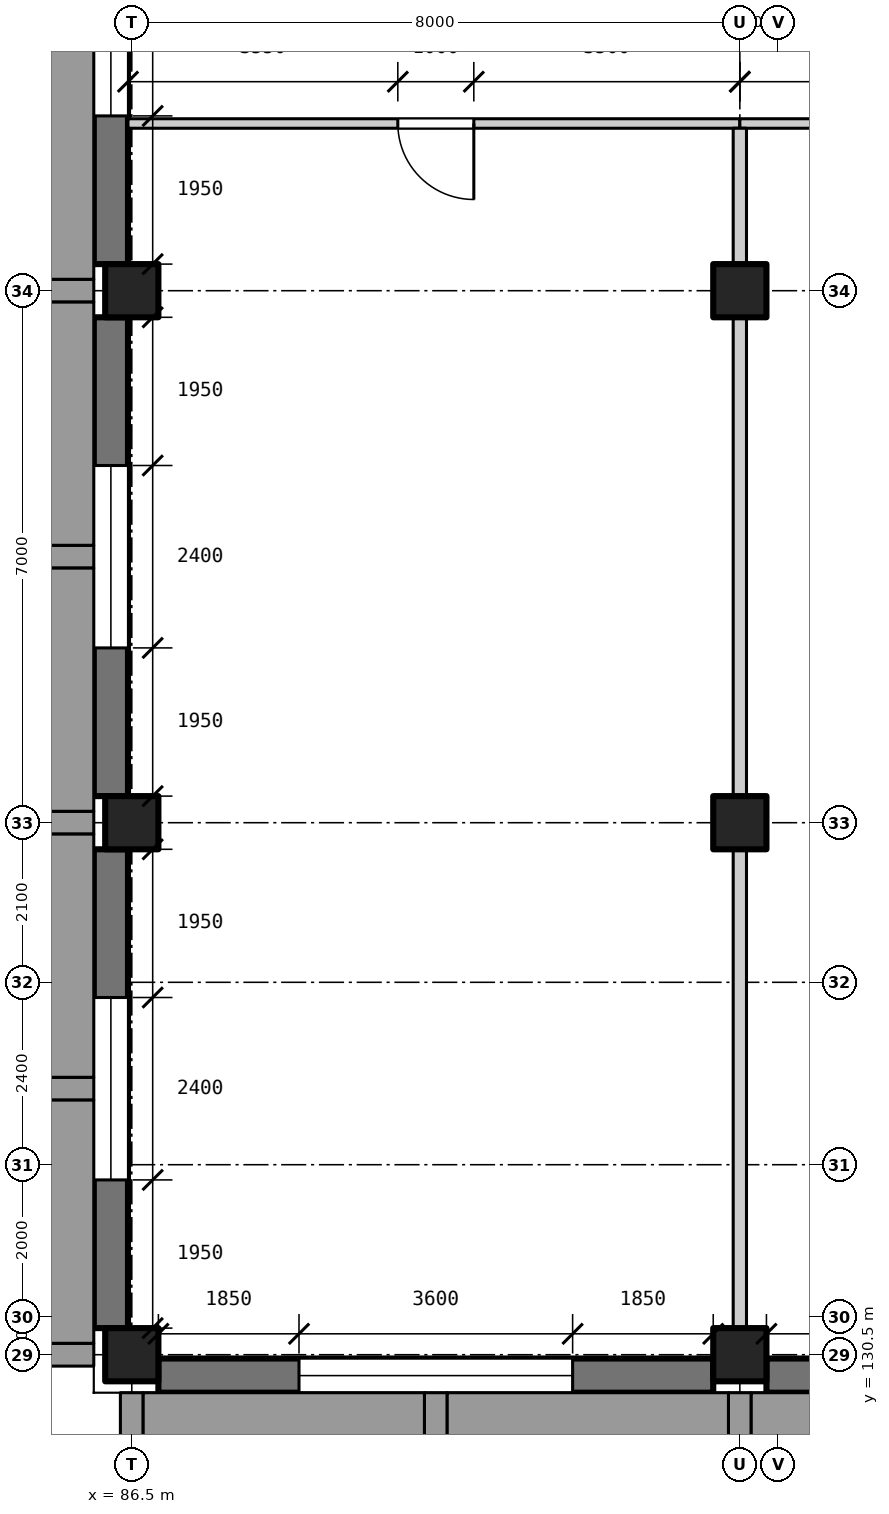
"""IFC4 building model, lengths in metres.
Left out: names, types, materials, properties, quantities, classifications, styles, units other than length and angle.
Written with IfcOpenShell. Run it as: python <this file> out.ifc"""

import sys

from ifc_helpers import new_model, si_unit, direction, frame, frame_2d, origin, origin_2d, place, context, subcontext, project, spatial, rectangle, extrude, element, fill, save


model = new_model("IFC4")
c1 = context("Model", 3, precision=1e-05, world=origin(), true_north=direction((0.0, 1.0)))
c2 = subcontext(c1, "Body", "Model", "MODEL_VIEW")
j1 = project(units=[si_unit("LENGTHUNIT", "METRE"), si_unit("PLANEANGLEUNIT", "RADIAN")], contexts=[c1])
p1 = place(None, origin())
s1 = spatial("IfcSite", under=j1, at=p1, CompositionType="ELEMENT")
p2 = place(p1, origin())
s2 = spatial("IfcBuilding", under=s1, at=p2, CompositionType="ELEMENT")
p3 = place(p2, frame((0.0, 0.0, 6.0)))
s3 = spatial("IfcBuildingStorey", under=s2, at=p3, CompositionType="ELEMENT", Elevation=6.0)
for number, where, z_axis, x_axis in (
    (1, (86.5, 130.5, 0.0), (0.0, 0.0, 1.0), (1.0, 0.0, 0.0)),
    (2, (86.5, 137.5, 0.0), (0.0, 0.0, 1.0), (1.0, 0.0, 0.0)),
    (3, (86.5, 144.5, 0.0), (0.0, 0.0, 1.0), (1.0, 0.0, 0.0)),
    (4, (94.5, 130.5, 0.0), (0.0, 0.0, 1.0), (1.0, 0.0, 0.0)),
    (5, (94.5, 137.5, 0.0), (0.0, 0.0, 1.0), (1.0, 0.0, 0.0)),
    (6, (94.5, 144.5, 0.0), (0.0, 0.0, 1.0), (1.0, 0.0, 0.0)),
):
    element("IfcColumn", number, at=place(p3, frame(where, z_axis=z_axis, x_axis=x_axis)), inside=s3, PredefinedType="COLUMN", context=c2, shape_type="SweptSolid", body=[
        extrude(rectangle(XDim=0.7, YDim=0.7, at=origin_2d()), origin(), (0.0, 0.0, 1.0), 4.2),
    ])
p4 = place(p3, frame((94.15, 130.225, 0.0), z_axis=(0.0, 0.0, 1.0), x_axis=(-1.0, 0.0, 0.0)))
e7 = element("IfcWall", 7, at=p4, inside=s3, PredefinedType="SOLIDWALL", context=c2, shape_type="SweptSolid", body=[
    extrude(rectangle(XDim=7.3, YDim=0.45, at=frame_2d((3.65, 0.0))), origin(), (0.0, 0.0, 1.0), 3.1),
])
p5 = place(p4, frame((1.85, 0.0, 0.9)))
e8 = element("IfcOpeningElement", 8, at=p5, cuts=e7, PredefinedType="OPENING", context=c2, shape_type="SweptSolid", body=[
    extrude(rectangle(XDim=3.6, YDim=1.6, at=frame_2d((1.8, 0.8))), frame((0.0, 0.235, 0.0), z_axis=(0.0, -1.0, 0.0), x_axis=(1.0, 0.0, 0.0)), (0.0, 0.0, 1.0), 0.47),
])
p6 = place(p3, frame((102.15, 130.225, 0.0), z_axis=(0.0, 0.0, 1.0), x_axis=(-1.0, 0.0, 0.0)))
e9 = element("IfcWall", 9, at=p6, inside=s3, PredefinedType="SOLIDWALL", context=c2, shape_type="SweptSolid", body=[
    extrude(rectangle(XDim=7.3, YDim=0.45, at=frame_2d((3.65, 0.0))), origin(), (0.0, 0.0, 1.0), 3.1),
])
p7 = place(p6, frame((1.85, 0.0, 0.9)))
e10 = element("IfcOpeningElement", 10, at=p7, cuts=e9, PredefinedType="OPENING", context=c2, shape_type="SweptSolid", body=[
    extrude(rectangle(XDim=3.6, YDim=1.6, at=frame_2d((1.8, 0.8))), frame((0.0, 0.235, 0.0), z_axis=(0.0, -1.0, 0.0), x_axis=(1.0, 0.0, 0.0)), (0.0, 0.0, 1.0), 0.47),
])
p8 = place(p3, frame((86.225, 130.85, 0.0), z_axis=(0.0, 0.0, 1.0), x_axis=(0.0, 1.0, 0.0)))
e11 = element("IfcWall", 11, at=p8, inside=s3, PredefinedType="SOLIDWALL", context=c2, shape_type="SweptSolid", body=[
    extrude(rectangle(XDim=6.3, YDim=0.45, at=frame_2d((3.15, 0.0))), origin(), (0.0, 0.0, 1.0), 3.2),
])
p9 = place(p8, frame((1.95, 0.0, 0.9)))
e12 = element("IfcOpeningElement", 12, at=p9, cuts=e11, PredefinedType="OPENING", context=c2, shape_type="SweptSolid", body=[
    extrude(rectangle(XDim=2.4, YDim=1.6, at=frame_2d((1.2, 0.8))), frame((0.0, 0.235, 0.0), z_axis=(0.0, -1.0, 0.0), x_axis=(1.0, 0.0, 0.0)), (0.0, 0.0, 1.0), 0.47),
])
p10 = place(p3, frame((86.225, 137.85, 0.0), z_axis=(0.0, 0.0, 1.0), x_axis=(0.0, 1.0, 0.0)))
e13 = element("IfcWall", 13, at=p10, inside=s3, PredefinedType="SOLIDWALL", context=c2, shape_type="SweptSolid", body=[
    extrude(rectangle(XDim=6.3, YDim=0.45, at=frame_2d((3.15, 0.0))), origin(), (0.0, 0.0, 1.0), 3.2),
])
p11 = place(p10, frame((1.95, 0.0, 0.9)))
e14 = element("IfcOpeningElement", 14, at=p11, cuts=e13, PredefinedType="OPENING", context=c2, shape_type="SweptSolid", body=[
    extrude(rectangle(XDim=2.4, YDim=1.6, at=frame_2d((1.2, 0.8))), frame((0.0, 0.235, 0.0), z_axis=(0.0, -1.0, 0.0), x_axis=(1.0, 0.0, 0.0)), (0.0, 0.0, 1.0), 0.47),
])
p12 = place(p3, frame((86.225, 144.85, 0.0), z_axis=(0.0, 0.0, 1.0), x_axis=(0.0, 1.0, 0.0)))
e15 = element("IfcWall", 15, at=p12, inside=s3, PredefinedType="SOLIDWALL", context=c2, shape_type="SweptSolid", body=[
    extrude(rectangle(XDim=6.3, YDim=0.45, at=frame_2d((3.15, 0.0))), origin(), (0.0, 0.0, 1.0), 3.2),
])
p13 = place(p12, frame((1.95, 0.0, 0.9)))
e16 = element("IfcOpeningElement", 16, at=p13, cuts=e15, PredefinedType="OPENING", context=c2, shape_type="SweptSolid", body=[
    extrude(rectangle(XDim=2.4, YDim=1.6, at=frame_2d((1.2, 0.8))), frame((0.0, 0.235, 0.0), z_axis=(0.0, -1.0, 0.0), x_axis=(1.0, 0.0, 0.0)), (0.0, 0.0, 1.0), 0.47),
])
p14 = place(p3, frame((86.45, 146.7, 0.0), z_axis=(0.0, 0.0, 1.0), x_axis=(1.0, 0.0, 0.0)))
e17 = element("IfcWall", 17, at=p14, inside=s3, PredefinedType="PARTITIONING", context=c2, shape_type="SweptSolid", body=[
    extrude(rectangle(XDim=8.05, YDim=0.125, at=frame_2d((4.025, 0.0))), origin(), (0.0, 0.0, 1.0), 3.9),
])
p15 = place(p14, frame((3.55, 0.0, 0.0)))
e18 = element("IfcOpeningElement", 18, at=p15, cuts=e17, PredefinedType="OPENING", context=c2, shape_type="SweptSolid", body=[
    extrude(rectangle(XDim=1.0, YDim=2.1, at=frame_2d((0.5, 1.05))), frame((0.0, 0.073, 0.0), z_axis=(0.0, -1.0, 0.0), x_axis=(1.0, 0.0, 0.0)), (0.0, 0.0, 1.0), 0.145),
])
p16 = place(p3, frame((94.5, 146.7, 0.0), z_axis=(0.0, 0.0, 1.0), x_axis=(1.0, 0.0, 0.0)))
e19 = element("IfcWall", 19, at=p16, inside=s3, PredefinedType="PARTITIONING", context=c2, shape_type="SweptSolid", body=[
    extrude(rectangle(XDim=8.0, YDim=0.125, at=frame_2d((4.0, 0.0))), origin(), (0.0, 0.0, 1.0), 3.9),
])
p17 = place(p16, frame((3.5, 0.0, 0.0)))
e20 = element("IfcOpeningElement", 20, at=p17, cuts=e19, PredefinedType="OPENING", context=c2, shape_type="SweptSolid", body=[
    extrude(rectangle(XDim=1.0, YDim=2.1, at=frame_2d((0.5, 1.05))), frame((0.0, 0.073, 0.0), z_axis=(0.0, -1.0, 0.0), x_axis=(1.0, 0.0, 0.0)), (0.0, 0.0, 1.0), 0.145),
])
for number, where, z_axis, x_axis in (
    (21, (94.5, 130.85, 0.0), (0.0, 0.0, 1.0), (0.0, 1.0, 0.0)),
    (22, (94.5, 137.85, 0.0), (0.0, 0.0, 1.0), (0.0, 1.0, 0.0)),
):
    element("IfcWall", number, at=place(p3, frame(where, z_axis=z_axis, x_axis=x_axis)), inside=s3, PredefinedType="PARTITIONING", context=c2, shape_type="SweptSolid", body=[
        extrude(rectangle(XDim=6.3, YDim=0.175, at=frame_2d((3.15, 0.0))), origin(), (0.0, 0.0, 1.0), 3.2),
    ])
p18 = place(p3, frame((94.5, 144.85, 0.0), z_axis=(0.0, 0.0, 1.0), x_axis=(0.0, 1.0, 0.0)))
e23 = element("IfcWall", 23, at=p18, inside=s3, PredefinedType="PARTITIONING", context=c2, shape_type="SweptSolid", body=[
    extrude(rectangle(XDim=1.787, YDim=0.175, at=frame_2d((0.894, 0.0))), origin(), (0.0, 0.0, 1.0), 3.2),
])
p19 = place(p5, origin())
e24 = element("IfcWindow", 24, at=p19, inside=s3, PartitioningType="SINGLE_PANEL", PredefinedType="WINDOW", context=c2, shape_type="SweptSolid", body=[
    extrude(rectangle(XDim=3.6, YDim=1.6, at=frame_2d((1.8, 0.8))), frame((0.0, -0.125, 0.0), z_axis=(0.0, -1.0, 0.0), x_axis=(1.0, 0.0, 0.0)), (0.0, 0.0, 1.0), 0.06),
])
fill(e8, e24)
p20 = place(p9, origin())
e25 = element("IfcWindow", 25, at=p20, inside=s3, PartitioningType="SINGLE_PANEL", PredefinedType="WINDOW", context=c2, shape_type="SweptSolid", body=[
    extrude(rectangle(XDim=2.4, YDim=1.6, at=frame_2d((1.2, 0.8))), frame((0.0, -0.125, 0.0), z_axis=(0.0, -1.0, 0.0), x_axis=(1.0, 0.0, 0.0)), (0.0, 0.0, 1.0), 0.06),
])
fill(e12, e25)
p21 = place(p11, origin())
e26 = element("IfcWindow", 26, at=p21, inside=s3, PartitioningType="SINGLE_PANEL", PredefinedType="WINDOW", context=c2, shape_type="SweptSolid", body=[
    extrude(rectangle(XDim=2.4, YDim=1.6, at=frame_2d((1.2, 0.8))), frame((0.0, -0.125, 0.0), z_axis=(0.0, -1.0, 0.0), x_axis=(1.0, 0.0, 0.0)), (0.0, 0.0, 1.0), 0.06),
])
fill(e14, e26)
p22 = place(p13, origin())
e27 = element("IfcWindow", 27, at=p22, inside=s3, PartitioningType="SINGLE_PANEL", PredefinedType="WINDOW", context=c2, shape_type="SweptSolid", body=[
    extrude(rectangle(XDim=2.4, YDim=1.6, at=frame_2d((1.2, 0.8))), frame((0.0, -0.125, 0.0), z_axis=(0.0, -1.0, 0.0), x_axis=(1.0, 0.0, 0.0)), (0.0, 0.0, 1.0), 0.06),
])
fill(e16, e27)
p23 = place(p15, frame((1.0, 0.0, 0.0), z_axis=(0.0, 0.0, 1.0), x_axis=(-1.0, 0.0, 0.0)))
e28 = element("IfcDoor", 28, at=p23, inside=s3, OperationType="SINGLE_SWING_LEFT", PredefinedType="DOOR", context=c2, shape_type="SweptSolid", body=[
    extrude(rectangle(XDim=1.0, YDim=2.1, at=frame_2d((0.5, 1.05))), frame((0.0, 0.025, 0.0), z_axis=(0.0, -1.0, 0.0), x_axis=(1.0, 0.0, 0.0)), (0.0, 0.0, 1.0), 0.05),
])
fill(e18, e28)
save(model, sys.argv[1])
